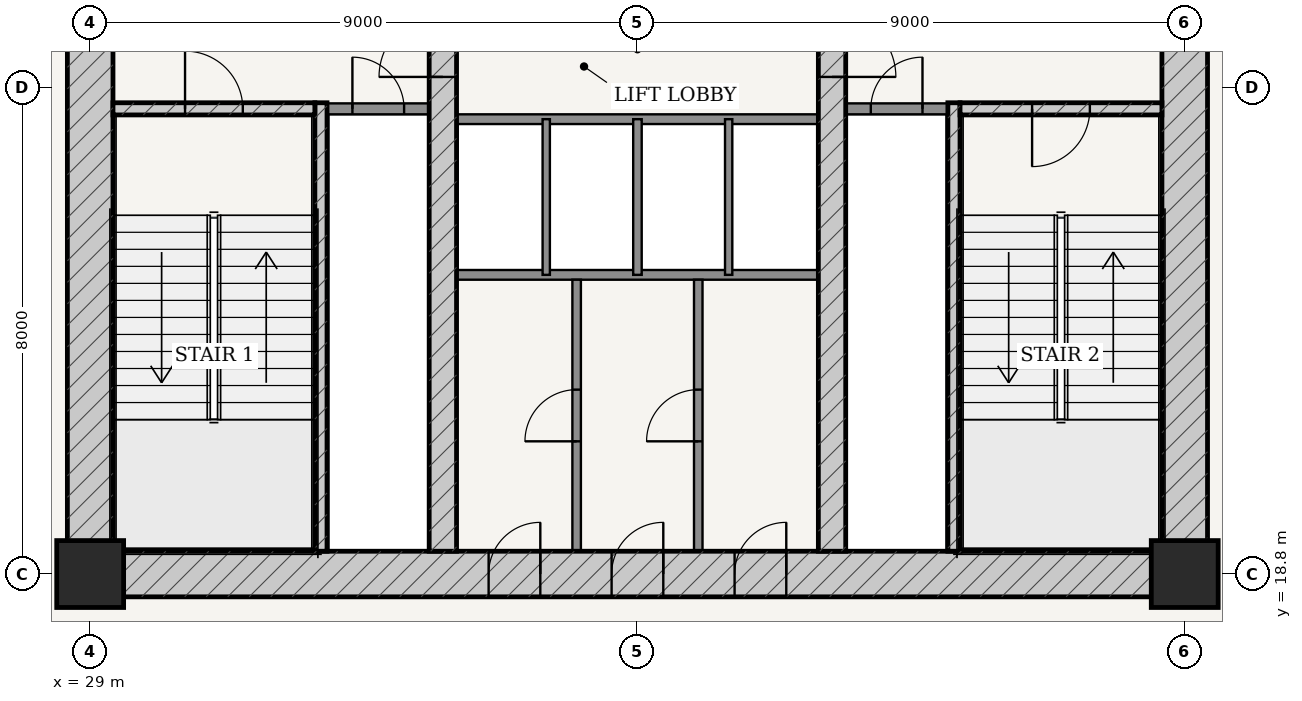
"""IFC4 building model, lengths in metres.
Left out: names, types, materials, properties, quantities, classifications, styles, units other than length and angle.
Written with IfcOpenShell. Run it as: python <this file> out.ifc"""

import sys

from ifc_helpers import new_model, si_unit, direction, frame, frame_2d, origin, origin_2d, place, context, subcontext, project, spatial, rectangle, extrude, source, transform, mapped, element, fill, save


model = new_model("IFC4")
c1 = context("Model", 3, precision=1e-05, world=origin(), true_north=direction((-0.2419218956, 0.970295726276)))
c2 = subcontext(c1, "Body", "Model", "MODEL_VIEW")
j1 = project(units=[si_unit("LENGTHUNIT", "METRE"), si_unit("PLANEANGLEUNIT", "RADIAN")], contexts=[c1])
p1 = place(None, origin())
s1 = spatial("IfcSite", under=j1, at=p1, CompositionType="ELEMENT")
p2 = place(p1, origin())
s2 = spatial("IfcBuilding", under=s1, at=p2, CompositionType="ELEMENT")
p3 = place(p2, frame((0.0, 0.0, 9.9)))
s3 = spatial("IfcBuildingStorey", under=s2, at=p3, CompositionType="ELEMENT", Elevation=9.9)
for number, where, z_axis, x_axis in (
    (1, (29.0, 18.8, 0.0), (0.0, 0.0, 1.0), (1.0, 0.0, 0.0)),
    (2, (47.0, 18.8, 0.0), (0.0, 0.0, 1.0), (1.0, 0.0, 0.0)),
):
    element("IfcColumn", number, at=place(p3, frame(where, z_axis=z_axis, x_axis=x_axis)), inside=s3, PredefinedType="COLUMN", context=c2, shape_type="SweptSolid", body=[
        extrude(rectangle(XDim=1.1, YDim=1.1, at=origin_2d()), origin(), (0.0, 0.0, 1.0), 4.5),
    ])
p4 = place(p3, frame((28.625, 18.8, 0.0), z_axis=(0.0, 0.0, 1.0), x_axis=(1.0, 0.0, 0.0)))
e3 = element("IfcWall", 3, at=p4, inside=s3, PredefinedType="SHEAR", context=c2, shape_type="SweptSolid", body=[
    extrude(rectangle(XDim=18.75, YDim=0.75, at=frame_2d((9.375, 0.0))), origin(), (0.0, 0.0, 1.0), 4.2),
])
p5 = place(p4, frame((6.927, 0.0, 0.0)))
e4 = element("IfcOpeningElement", 4, at=p5, cuts=e3, PredefinedType="OPENING", context=c2, shape_type="SweptSolid", body=[
    extrude(rectangle(XDim=0.85, YDim=2.1, at=frame_2d((0.425, 1.05))), frame((0.0, 0.385, 0.0), z_axis=(0.0, -1.0, 0.0), x_axis=(1.0, 0.0, 0.0)), (0.0, 0.0, 1.0), 0.77),
])
p6 = place(p4, frame((8.95, 0.0, 0.0)))
e5 = element("IfcOpeningElement", 5, at=p6, cuts=e3, PredefinedType="OPENING", context=c2, shape_type="SweptSolid", body=[
    extrude(rectangle(XDim=0.85, YDim=2.1, at=frame_2d((0.425, 1.05))), frame((0.0, 0.385, 0.0), z_axis=(0.0, -1.0, 0.0), x_axis=(1.0, 0.0, 0.0)), (0.0, 0.0, 1.0), 0.77),
])
p7 = place(p4, frame((10.972, 0.0, 0.0)))
e6 = element("IfcOpeningElement", 6, at=p7, cuts=e3, PredefinedType="OPENING", context=c2, shape_type="SweptSolid", body=[
    extrude(rectangle(XDim=0.85, YDim=2.1, at=frame_2d((0.425, 1.05))), frame((0.0, 0.385, 0.0), z_axis=(0.0, -1.0, 0.0), x_axis=(1.0, 0.0, 0.0)), (0.0, 0.0, 1.0), 0.77),
])
p8 = place(p3, frame((29.0, 19.175, 0.0), z_axis=(0.0, 0.0, 1.0), x_axis=(0.0, 1.0, 0.0)))
e7 = element("IfcWall", 7, at=p8, inside=s3, PredefinedType="SHEAR", context=c2, shape_type="SweptSolid", body=[
    extrude(rectangle(XDim=15.25, YDim=0.75, at=frame_2d((7.625, 0.0))), origin(), (0.0, 0.0, 1.0), 4.2),
])
p9 = place(p8, frame((9.875, 0.0, 0.0)))
e8 = element("IfcOpeningElement", 8, at=p9, cuts=e7, PredefinedType="OPENING", context=c2, shape_type="SweptSolid", body=[
    extrude(rectangle(XDim=1.5, YDim=2.2, at=frame_2d((0.75, 1.1))), frame((0.0, 0.385, 0.0), z_axis=(0.0, -1.0, 0.0), x_axis=(1.0, 0.0, 0.0)), (0.0, 0.0, 1.0), 0.77),
])
p10 = place(p3, frame((47.0, 19.175, 0.0), z_axis=(0.0, 0.0, 1.0), x_axis=(0.0, 1.0, 0.0)))
e9 = element("IfcWall", 9, at=p10, inside=s3, PredefinedType="SHEAR", context=c2, shape_type="SweptSolid", body=[
    extrude(rectangle(XDim=15.25, YDim=0.75, at=frame_2d((7.625, 0.0))), origin(), (0.0, 0.0, 1.0), 4.2),
])
p11 = place(p10, frame((9.875, 0.0, 0.0)))
e10 = element("IfcOpeningElement", 10, at=p11, cuts=e9, PredefinedType="OPENING", context=c2, shape_type="SweptSolid", body=[
    extrude(rectangle(XDim=1.5, YDim=2.2, at=frame_2d((0.75, 1.1))), frame((0.0, 0.385, 0.0), z_axis=(0.0, -1.0, 0.0), x_axis=(1.0, 0.0, 0.0)), (0.0, 0.0, 1.0), 0.77),
])
p12 = place(p3, frame((32.795, 19.175, 0.0), z_axis=(0.0, 0.0, 1.0), x_axis=(0.0, 1.0, 0.0)))
e11 = element("IfcWall", 11, at=p12, inside=s3, PredefinedType="SOLIDWALL", context=c2, shape_type="SweptSolid", body=[
    extrude(rectangle(XDim=7.375, YDim=0.2, at=frame_2d((3.688, 0.0))), origin(), (0.0, 0.0, 1.0), 4.2),
])
p13 = place(p3, frame((29.375, 26.45, 0.0), z_axis=(0.0, 0.0, 1.0), x_axis=(1.0, 0.0, 0.0)))
e12 = element("IfcWall", 12, at=p13, inside=s3, PredefinedType="SOLIDWALL", context=c2, shape_type="SweptSolid", body=[
    extrude(rectangle(XDim=3.32, YDim=0.2, at=frame_2d((1.66, 0.0))), origin(), (0.0, 0.0, 1.0), 4.2),
])
p14 = place(p13, frame((1.185, 0.0, 0.0)))
e13 = element("IfcOpeningElement", 13, at=p14, cuts=e12, PredefinedType="OPENING", context=c2, shape_type="SweptSolid", body=[
    extrude(rectangle(XDim=0.95, YDim=2.15, at=frame_2d((0.475, 1.075))), frame((0.0, 0.11, 0.0), z_axis=(0.0, -1.0, 0.0), x_axis=(1.0, 0.0, 0.0)), (0.0, 0.0, 1.0), 0.22),
])
p15 = place(p3, frame((43.205, 19.175, 0.0), z_axis=(0.0, 0.0, 1.0), x_axis=(0.0, 1.0, 0.0)))
e14 = element("IfcWall", 14, at=p15, inside=s3, PredefinedType="SOLIDWALL", context=c2, shape_type="SweptSolid", body=[
    extrude(rectangle(XDim=7.375, YDim=0.2, at=frame_2d((3.688, 0.0))), origin(), (0.0, 0.0, 1.0), 4.2),
])
p16 = place(p3, frame((43.305, 26.45, 0.0), z_axis=(0.0, 0.0, 1.0), x_axis=(1.0, 0.0, 0.0)))
e15 = element("IfcWall", 15, at=p16, inside=s3, PredefinedType="SOLIDWALL", context=c2, shape_type="SweptSolid", body=[
    extrude(rectangle(XDim=3.32, YDim=0.2, at=frame_2d((1.66, 0.0))), origin(), (0.0, 0.0, 1.0), 4.2),
])
p17 = place(p16, frame((1.185, 0.0, 0.0)))
e16 = element("IfcOpeningElement", 16, at=p17, cuts=e15, PredefinedType="OPENING", context=c2, shape_type="SweptSolid", body=[
    extrude(rectangle(XDim=0.95, YDim=2.15, at=frame_2d((0.475, 1.075))), frame((0.0, 0.11, 0.0), z_axis=(0.0, -1.0, 0.0), x_axis=(1.0, 0.0, 0.0)), (0.0, 0.0, 1.0), 0.22),
])
p18 = place(p3, frame((34.8, 19.175, 0.0), z_axis=(0.0, 0.0, 1.0), x_axis=(0.0, 1.0, 0.0)))
e17 = element("IfcWall", 17, at=p18, inside=s3, PredefinedType="SHEAR", context=c2, shape_type="SweptSolid", body=[
    extrude(rectangle(XDim=15.25, YDim=0.45, at=frame_2d((7.625, 0.0))), origin(), (0.0, 0.0, 1.0), 4.2),
])
p19 = place(p18, frame((7.8, 0.0, 0.0)))
e18 = element("IfcOpeningElement", 18, at=p19, cuts=e17, PredefinedType="OPENING", context=c2, shape_type="SweptSolid", body=[
    extrude(rectangle(XDim=1.05, YDim=2.15, at=frame_2d((0.525, 1.075))), frame((0.0, 0.235, 0.0), z_axis=(0.0, -1.0, 0.0), x_axis=(1.0, 0.0, 0.0)), (0.0, 0.0, 1.0), 0.47),
])
p20 = place(p3, frame((41.2, 19.175, 0.0), z_axis=(0.0, 0.0, 1.0), x_axis=(0.0, 1.0, 0.0)))
e19 = element("IfcWall", 19, at=p20, inside=s3, PredefinedType="SHEAR", context=c2, shape_type="SweptSolid", body=[
    extrude(rectangle(XDim=15.25, YDim=0.45, at=frame_2d((7.625, 0.0))), origin(), (0.0, 0.0, 1.0), 4.2),
])
p21 = place(p20, frame((7.8, 0.0, 0.0)))
e20 = element("IfcOpeningElement", 20, at=p21, cuts=e19, PredefinedType="OPENING", context=c2, shape_type="SweptSolid", body=[
    extrude(rectangle(XDim=1.05, YDim=2.15, at=frame_2d((0.525, 1.075))), frame((0.0, 0.235, 0.0), z_axis=(0.0, -1.0, 0.0), x_axis=(1.0, 0.0, 0.0)), (0.0, 0.0, 1.0), 0.47),
])
p22 = place(p3, frame((32.9, 26.45, 0.0), z_axis=(0.0, 0.0, 1.0), x_axis=(1.0, 0.0, 0.0)))
e21 = element("IfcWall", 21, at=p22, inside=s3, PredefinedType="PARTITIONING", context=c2, shape_type="SweptSolid", body=[
    extrude(rectangle(XDim=1.675, YDim=0.18, at=frame_2d((0.837, 0.0))), origin(), (0.0, 0.0, 1.0), 4.2),
])
p23 = place(p22, frame((0.413, 0.0, 0.0)))
e22 = element("IfcOpeningElement", 22, at=p23, cuts=e21, PredefinedType="OPENING", context=c2, shape_type="SweptSolid", body=[
    extrude(rectangle(XDim=0.85, YDim=2.1, at=frame_2d((0.425, 1.05))), frame((0.0, 0.1, 0.0), z_axis=(0.0, -1.0, 0.0), x_axis=(1.0, 0.0, 0.0)), (0.0, 0.0, 1.0), 0.2),
])
p24 = place(p3, frame((41.425, 26.45, 0.0), z_axis=(0.0, 0.0, 1.0), x_axis=(1.0, 0.0, 0.0)))
e23 = element("IfcWall", 23, at=p24, inside=s3, PredefinedType="PARTITIONING", context=c2, shape_type="SweptSolid", body=[
    extrude(rectangle(XDim=1.675, YDim=0.18, at=frame_2d((0.837, 0.0))), origin(), (0.0, 0.0, 1.0), 4.2),
])
p25 = place(p24, frame((0.413, 0.0, 0.0)))
e24 = element("IfcOpeningElement", 24, at=p25, cuts=e23, PredefinedType="OPENING", context=c2, shape_type="SweptSolid", body=[
    extrude(rectangle(XDim=0.85, YDim=2.1, at=frame_2d((0.425, 1.05))), frame((0.0, 0.1, 0.0), z_axis=(0.0, -1.0, 0.0), x_axis=(1.0, 0.0, 0.0)), (0.0, 0.0, 1.0), 0.2),
])
for number, where, z_axis, x_axis in (
    (25, (35.025, 26.28, 0.0), (0.0, 0.0, 1.0), (1.0, 0.0, 0.0)),
    (26, (35.025, 23.72, 0.0), (0.0, 0.0, 1.0), (1.0, 0.0, 0.0)),
):
    element("IfcWall", number, at=place(p3, frame(where, z_axis=z_axis, x_axis=x_axis)), inside=s3, PredefinedType="PARTITIONING", context=c2, shape_type="SweptSolid", body=[
        extrude(rectangle(XDim=5.95, YDim=0.16, at=frame_2d((2.975, 0.0))), origin(), (0.0, 0.0, 1.0), 4.2),
    ])
p26 = place(p3, frame((36.5, 23.72, 0.0), z_axis=(0.0, 0.0, 1.0), x_axis=(0.0, 1.0, 0.0)))
e27 = element("IfcWall", 27, at=p26, inside=s3, PredefinedType="PARTITIONING", context=c2, shape_type="SweptSolid", body=[
    extrude(rectangle(XDim=2.56, YDim=0.12, at=frame_2d((1.28, 0.0))), origin(), (0.0, 0.0, 1.0), 4.2),
])
p27 = place(p3, frame((38.0, 23.72, 0.0), z_axis=(0.0, 0.0, 1.0), x_axis=(0.0, 1.0, 0.0)))
e28 = element("IfcWall", 28, at=p27, inside=s3, PredefinedType="PARTITIONING", context=c2, shape_type="SweptSolid", body=[
    extrude(rectangle(XDim=2.56, YDim=0.14, at=frame_2d((1.28, 0.0))), origin(), (0.0, 0.0, 1.0), 4.2),
])
p28 = place(p3, frame((39.5, 23.72, 0.0), z_axis=(0.0, 0.0, 1.0), x_axis=(0.0, 1.0, 0.0)))
e29 = element("IfcWall", 29, at=p28, inside=s3, PredefinedType="PARTITIONING", context=c2, shape_type="SweptSolid", body=[
    extrude(rectangle(XDim=2.56, YDim=0.12, at=frame_2d((1.28, 0.0))), origin(), (0.0, 0.0, 1.0), 4.2),
])
p29 = place(p3, frame((37.0, 19.175, 0.0), z_axis=(0.0, 0.0, 1.0), x_axis=(0.0, 1.0, 0.0)))
e30 = element("IfcWall", 30, at=p29, inside=s3, PredefinedType="PARTITIONING", context=c2, shape_type="SweptSolid", body=[
    extrude(rectangle(XDim=4.465, YDim=0.14, at=frame_2d((2.232, 0.0))), origin(), (0.0, 0.0, 1.0), 4.2),
])
p30 = place(p29, frame((1.808, 0.0, 0.0)))
e31 = element("IfcOpeningElement", 31, at=p30, cuts=e30, PredefinedType="OPENING", context=c2, shape_type="SweptSolid", body=[
    extrude(rectangle(XDim=0.85, YDim=2.1, at=frame_2d((0.425, 1.05))), frame((0.0, 0.08, 0.0), z_axis=(0.0, -1.0, 0.0), x_axis=(1.0, 0.0, 0.0)), (0.0, 0.0, 1.0), 0.16),
])
p31 = place(p3, frame((39.0, 19.175, 0.0), z_axis=(0.0, 0.0, 1.0), x_axis=(0.0, 1.0, 0.0)))
e32 = element("IfcWall", 32, at=p31, inside=s3, PredefinedType="PARTITIONING", context=c2, shape_type="SweptSolid", body=[
    extrude(rectangle(XDim=4.465, YDim=0.14, at=frame_2d((2.232, 0.0))), origin(), (0.0, 0.0, 1.0), 4.2),
])
p32 = place(p31, frame((1.808, 0.0, 0.0)))
e33 = element("IfcOpeningElement", 33, at=p32, cuts=e32, PredefinedType="OPENING", context=c2, shape_type="SweptSolid", body=[
    extrude(rectangle(XDim=0.85, YDim=2.1, at=frame_2d((0.425, 1.05))), frame((0.0, 0.08, 0.0), z_axis=(0.0, -1.0, 0.0), x_axis=(1.0, 0.0, 0.0)), (0.0, 0.0, 1.0), 0.16),
])
m1 = source(origin(), c2, "Body", "SweptSolid", [
    extrude(rectangle(XDim=1.05, YDim=2.15, at=frame_2d((0.525, 1.075))), frame((0.0, 0.025, 0.0), z_axis=(0.0, -1.0, 0.0), x_axis=(1.0, 0.0, 0.0)), (0.0, 0.0, 1.0), 0.05),
])
p33 = place(p19, origin())
e34 = element("IfcDoor", 34, at=p33, inside=s3, OperationType="SINGLE_SWING_LEFT", PredefinedType="DOOR", context=c2, shape_type="MappedRepresentation", body=[
    mapped(m1, transform((0.0, 0.0, 0.0), scale=1.0)),
])
fill(e18, e34)
p34 = place(p21, frame((1.05, 0.0, 0.0), z_axis=(0.0, 0.0, 1.0), x_axis=(-1.0, 0.0, 0.0)))
e35 = element("IfcDoor", 35, at=p34, inside=s3, OperationType="SINGLE_SWING_RIGHT", PredefinedType="DOOR", context=c2, shape_type="MappedRepresentation", body=[
    mapped(m1, transform((0.0, 0.0, 0.0), scale=1.0)),
])
fill(e20, e35)
m2 = source(origin(), c2, "Body", "SweptSolid", [
    extrude(rectangle(XDim=0.95, YDim=2.15, at=frame_2d((0.475, 1.075))), frame((0.0, 0.025, 0.0), z_axis=(0.0, -1.0, 0.0), x_axis=(1.0, 0.0, 0.0)), (0.0, 0.0, 1.0), 0.05),
])
p35 = place(p14, origin())
e36 = element("IfcDoor", 36, at=p35, inside=s3, OperationType="SINGLE_SWING_LEFT", PredefinedType="DOOR", context=c2, shape_type="MappedRepresentation", body=[
    mapped(m2, transform((0.0, 0.0, 0.0), scale=1.0)),
])
fill(e13, e36)
p36 = place(p17, frame((0.95, 0.0, 0.0), z_axis=(0.0, 0.0, 1.0), x_axis=(-1.0, 0.0, 0.0)))
e37 = element("IfcDoor", 37, at=p36, inside=s3, OperationType="SINGLE_SWING_RIGHT", PredefinedType="DOOR", context=c2, shape_type="MappedRepresentation", body=[
    mapped(m2, transform((0.0, 0.0, 0.0), scale=1.0)),
])
fill(e16, e37)
m3 = source(origin(), c2, "Body", "SweptSolid", [
    extrude(rectangle(XDim=0.85, YDim=2.1, at=frame_2d((0.425, 1.05))), frame((0.0, 0.025, 0.0), z_axis=(0.0, -1.0, 0.0), x_axis=(1.0, 0.0, 0.0)), (0.0, 0.0, 1.0), 0.05),
])
p37 = place(p23, origin())
e38 = element("IfcDoor", 38, at=p37, inside=s3, OperationType="SINGLE_SWING_LEFT", PredefinedType="DOOR", context=c2, shape_type="MappedRepresentation", body=[
    mapped(m3, transform((0.0, 0.0, 0.0), scale=1.0)),
])
fill(e22, e38)
p38 = place(p25, origin())
e39 = element("IfcDoor", 39, at=p38, inside=s3, OperationType="SINGLE_SWING_RIGHT", PredefinedType="DOOR", context=c2, shape_type="MappedRepresentation", body=[
    mapped(m3, transform((0.0, 0.0, 0.0), scale=1.0)),
])
fill(e24, e39)
p39 = place(p5, origin())
e40 = element("IfcDoor", 40, at=p39, inside=s3, OperationType="SINGLE_SWING_RIGHT", PredefinedType="DOOR", context=c2, shape_type="MappedRepresentation", body=[
    mapped(m3, transform((0.0, 0.0, 0.0), scale=1.0)),
])
fill(e4, e40)
p40 = place(p6, origin())
e41 = element("IfcDoor", 41, at=p40, inside=s3, OperationType="SINGLE_SWING_RIGHT", PredefinedType="DOOR", context=c2, shape_type="MappedRepresentation", body=[
    mapped(m3, transform((0.0, 0.0, 0.0), scale=1.0)),
])
fill(e5, e41)
p41 = place(p7, origin())
e42 = element("IfcDoor", 42, at=p41, inside=s3, OperationType="SINGLE_SWING_RIGHT", PredefinedType="DOOR", context=c2, shape_type="MappedRepresentation", body=[
    mapped(m3, transform((0.0, 0.0, 0.0), scale=1.0)),
])
fill(e6, e42)
p42 = place(p30, origin())
e43 = element("IfcDoor", 43, at=p42, inside=s3, OperationType="SINGLE_SWING_LEFT", PredefinedType="DOOR", context=c2, shape_type="MappedRepresentation", body=[
    mapped(m3, transform((0.0, 0.0, 0.0), scale=1.0)),
])
fill(e31, e43)
p43 = place(p32, origin())
e44 = element("IfcDoor", 44, at=p43, inside=s3, OperationType="SINGLE_SWING_LEFT", PredefinedType="DOOR", context=c2, shape_type="MappedRepresentation", body=[
    mapped(m3, transform((0.0, 0.0, 0.0), scale=1.0)),
])
fill(e33, e44)
save(model, sys.argv[1])
